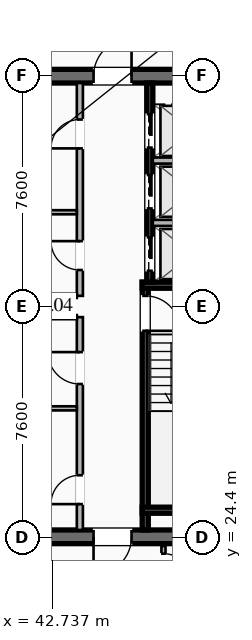
"""IFC4 building model, lengths in metres.
Left out: names, types, materials, properties, quantities, classifications, styles, units other than length and angle.
Written with IfcOpenShell. Run it as: python <this file> out.ifc"""

import sys

from ifc_helpers import new_model, si_unit, direction, frame, frame_2d, origin, place, context, subcontext, project, spatial, rectangle, extrude, element, fill, save


model = new_model("IFC4")
c1 = context("Model", 3, precision=1e-05, world=origin(), true_north=direction((0.0, 1.0)))
c2 = subcontext(c1, "Body", "Model", "MODEL_VIEW")
j1 = project(units=[si_unit("LENGTHUNIT", "METRE"), si_unit("PLANEANGLEUNIT", "RADIAN")], contexts=[c1])
p1 = place(None, origin())
s1 = spatial("IfcSite", under=j1, at=p1, CompositionType="ELEMENT")
p2 = place(p1, origin())
s2 = spatial("IfcBuilding", under=s1, at=p2, CompositionType="ELEMENT")
p3 = place(p2, frame((0.0, 0.0, 243.25)))
s3 = spatial("IfcBuildingStorey", under=s2, at=p3, CompositionType="ELEMENT", Elevation=243.25)
p4 = place(p3, frame((49.35, 24.425, 0.0), z_axis=(0.0, 0.0, 1.0), x_axis=(-1.0, 0.0, 0.0)))
e1 = element("IfcWall", 1, at=p4, inside=s3, PredefinedType="SHEAR", context=c2, shape_type="SweptSolid", body=[
    extrude(rectangle(XDim=14.7, YDim=0.45, at=frame_2d((7.35, 0.0))), origin(), (0.0, 0.0, 1.0), 3.55),
])
p5 = place(p4, frame((9.05, 0.0, 0.0)))
e2 = element("IfcOpeningElement", 2, at=p5, cuts=e1, PredefinedType="OPENING", context=c2, shape_type="SweptSolid", body=[
    extrude(rectangle(XDim=1.25, YDim=2.25, at=frame_2d((0.625, 1.125))), frame((0.0, 0.235, 0.0), z_axis=(0.0, -1.0, 0.0), x_axis=(1.0, 0.0, 0.0)), (0.0, 0.0, 1.0), 0.47),
])
p6 = place(p4, frame((4.0, 0.0, 0.0)))
e3 = element("IfcOpeningElement", 3, at=p6, cuts=e1, PredefinedType="OPENING", context=c2, shape_type="SweptSolid", body=[
    extrude(rectangle(XDim=1.25, YDim=2.25, at=frame_2d((0.625, 1.125))), frame((0.0, 0.235, 0.0), z_axis=(0.0, -1.0, 0.0), x_axis=(1.0, 0.0, 0.0)), (0.0, 0.0, 1.0), 0.47),
])
p7 = place(p3, frame((34.65, 39.575, 0.0), z_axis=(0.0, 0.0, 1.0), x_axis=(1.0, 0.0, 0.0)))
e4 = element("IfcWall", 4, at=p7, inside=s3, PredefinedType="SHEAR", context=c2, shape_type="SweptSolid", body=[
    extrude(rectangle(XDim=14.7, YDim=0.45, at=frame_2d((7.35, 0.0))), origin(), (0.0, 0.0, 1.0), 3.55),
])
p8 = place(p7, frame((4.4, 0.0, 0.0)))
e5 = element("IfcOpeningElement", 5, at=p8, cuts=e4, PredefinedType="OPENING", context=c2, shape_type="SweptSolid", body=[
    extrude(rectangle(XDim=1.25, YDim=2.25, at=frame_2d((0.625, 1.125))), frame((0.0, 0.235, 0.0), z_axis=(0.0, -1.0, 0.0), x_axis=(1.0, 0.0, 0.0)), (0.0, 0.0, 1.0), 0.47),
])
p9 = place(p7, frame((9.45, 0.0, 0.0)))
e6 = element("IfcOpeningElement", 6, at=p9, cuts=e4, PredefinedType="OPENING", context=c2, shape_type="SweptSolid", body=[
    extrude(rectangle(XDim=1.25, YDim=2.25, at=frame_2d((0.625, 1.125))), frame((0.0, 0.235, 0.0), z_axis=(0.0, -1.0, 0.0), x_axis=(1.0, 0.0, 0.0)), (0.0, 0.0, 1.0), 0.47),
])
p10 = place(p3, frame((45.8, 32.8, 0.0), z_axis=(0.0, 0.0, 1.0), x_axis=(0.0, -1.0, 0.0)))
e7 = element("IfcWall", 7, at=p10, inside=s3, PredefinedType="SHEAR", context=c2, shape_type="SweptSolid", body=[
    extrude(rectangle(XDim=8.15, YDim=0.2, at=frame_2d((4.075, 0.0))), origin(), (0.0, 0.0, 1.0), 3.25),
])
p11 = place(p10, frame((0.45, 0.0, 0.0)))
e8 = element("IfcOpeningElement", 8, at=p11, cuts=e7, PredefinedType="OPENING", context=c2, shape_type="SweptSolid", body=[
    extrude(rectangle(XDim=1.15, YDim=2.2, at=frame_2d((0.575, 1.1))), frame((0.0, 0.11, 0.0), z_axis=(0.0, -1.0, 0.0), x_axis=(1.0, 0.0, 0.0)), (0.0, 0.0, 1.0), 0.22),
])
for number, where, z_axis, x_axis in (
    (9, (45.7, 32.7, 0.0), (0.0, 0.0, 1.0), (1.0, 0.0, 0.0)),
    (10, (45.7, 25.3, 0.0), (0.0, 0.0, 1.0), (1.0, 0.0, 0.0)),
):
    element("IfcWall", number, at=place(p3, frame(where, z_axis=z_axis, x_axis=x_axis)), inside=s3, PredefinedType="SHEAR", context=c2, shape_type="SweptSolid", body=[
        extrude(rectangle(XDim=3.65, YDim=0.2, at=frame_2d((1.825, 0.0))), origin(), (0.0, 0.0, 1.0), 3.25),
    ])
p12 = place(p3, frame((45.95, 39.35, 0.0), z_axis=(0.0, 0.0, 1.0), x_axis=(0.0, -1.0, 0.0)))
e11 = element("IfcWall", 11, at=p12, inside=s3, PredefinedType="SHEAR", context=c2, shape_type="SweptSolid", body=[
    extrude(rectangle(XDim=6.55, YDim=0.2, at=frame_2d((3.275, 0.0))), origin(), (0.0, 0.0, 1.0), 3.25),
])
p13 = place(p12, frame((5.075, 0.0, 0.0)))
e12 = element("IfcOpeningElement", 12, at=p13, cuts=e11, PredefinedType="OPENING", context=c2, shape_type="SweptSolid", body=[
    extrude(rectangle(XDim=1.1, YDim=2.2, at=frame_2d((0.55, 1.1))), frame((0.0, 0.11, 0.0), z_axis=(0.0, -1.0, 0.0), x_axis=(1.0, 0.0, 0.0)), (0.0, 0.0, 1.0), 0.22),
])
p14 = place(p12, frame((3.025, 0.0, 0.0)))
e13 = element("IfcOpeningElement", 13, at=p14, cuts=e11, PredefinedType="OPENING", context=c2, shape_type="SweptSolid", body=[
    extrude(rectangle(XDim=1.1, YDim=2.2, at=frame_2d((0.55, 1.1))), frame((0.0, 0.11, 0.0), z_axis=(0.0, -1.0, 0.0), x_axis=(1.0, 0.0, 0.0)), (0.0, 0.0, 1.0), 0.22),
])
p15 = place(p12, frame((1.025, 0.0, 0.0)))
e14 = element("IfcOpeningElement", 14, at=p15, cuts=e11, PredefinedType="OPENING", context=c2, shape_type="SweptSolid", body=[
    extrude(rectangle(XDim=1.1, YDim=2.2, at=frame_2d((0.55, 1.1))), frame((0.0, 0.11, 0.0), z_axis=(0.0, -1.0, 0.0), x_axis=(1.0, 0.0, 0.0)), (0.0, 0.0, 1.0), 0.22),
])
for number, where, z_axis, x_axis in (
    (15, (46.05, 34.75, 0.0), (0.0, 0.0, 1.0), (1.0, 0.0, 0.0)),
    (16, (46.05, 36.8, 0.0), (0.0, 0.0, 1.0), (1.0, 0.0, 0.0)),
):
    element("IfcWall", number, at=place(p3, frame(where, z_axis=z_axis, x_axis=x_axis)), inside=s3, PredefinedType="SOLIDWALL", context=c2, shape_type="SweptSolid", body=[
        extrude(rectangle(XDim=3.3, YDim=0.2, at=frame_2d((1.65, 0.0))), origin(), (0.0, 0.0, 1.0), 3.25),
    ])
p16 = place(p3, frame((43.65, 24.65, 0.0), z_axis=(0.0, 0.0, 1.0), x_axis=(0.0, 1.0, 0.0)))
e17 = element("IfcWall", 17, at=p16, inside=s3, PredefinedType="SOLIDWALL", context=c2, shape_type="SweptSolid", body=[
    extrude(rectangle(XDim=7.0, YDim=0.2, at=frame_2d((3.5, 0.0))), origin(), (0.0, 0.0, 1.0), 2.393),
])
p17 = place(p16, frame((0.85, 0.0, 0.0)))
e18 = element("IfcOpeningElement", 18, at=p17, cuts=e17, PredefinedType="OPENING", context=c2, shape_type="SweptSolid", body=[
    extrude(rectangle(XDim=0.95, YDim=2.05, at=frame_2d((0.475, 1.025))), frame((0.0, 0.11, 0.0), z_axis=(0.0, -1.0, 0.0), x_axis=(1.0, 0.0, 0.0)), (0.0, 0.0, 1.0), 0.22),
])
p18 = place(p16, frame((4.8, 0.0, 0.0)))
e19 = element("IfcOpeningElement", 19, at=p18, cuts=e17, PredefinedType="OPENING", context=c2, shape_type="SweptSolid", body=[
    extrude(rectangle(XDim=1.05, YDim=2.2, at=frame_2d((0.525, 1.1))), frame((0.0, 0.11, 0.0), z_axis=(0.0, -1.0, 0.0), x_axis=(1.0, 0.0, 0.0)), (0.0, 0.0, 1.0), 0.22),
])
for number, where, z_axis, x_axis in (
    (20, (41.67, 31.65, 0.0), (0.0, 0.0, 1.0), (1.0, 0.0, 0.0)),
    (21, (41.67, 28.65, 0.0), (0.0, 0.0, 1.0), (1.0, 0.0, 0.0)),
):
    element("IfcWall", number, at=place(p3, frame(where, z_axis=z_axis, x_axis=x_axis)), inside=s3, PredefinedType="PARTITIONING", context=c2, shape_type="SweptSolid", body=[
        extrude(rectangle(XDim=1.88, YDim=0.135, at=frame_2d((0.94, 0.0))), origin(), (0.0, 0.0, 1.0), 2.393),
    ])
p19 = place(p3, frame((43.65, 32.35, 0.0), z_axis=(0.0, 0.0, 1.0), x_axis=(0.0, 1.0, 0.0)))
e22 = element("IfcWall", 22, at=p19, inside=s3, PredefinedType="SOLIDWALL", context=c2, shape_type="SweptSolid", body=[
    extrude(rectangle(XDim=7.0, YDim=0.2, at=frame_2d((3.5, 0.0))), origin(), (0.0, 0.0, 1.0), 2.393),
])
p20 = place(p19, frame((0.85, 0.0, 0.0)))
e23 = element("IfcOpeningElement", 23, at=p20, cuts=e22, PredefinedType="OPENING", context=c2, shape_type="SweptSolid", body=[
    extrude(rectangle(XDim=0.95, YDim=2.05, at=frame_2d((0.475, 1.025))), frame((0.0, 0.11, 0.0), z_axis=(0.0, -1.0, 0.0), x_axis=(1.0, 0.0, 0.0)), (0.0, 0.0, 1.0), 0.22),
])
p21 = place(p19, frame((4.85, 0.0, 0.0)))
e24 = element("IfcOpeningElement", 24, at=p21, cuts=e22, PredefinedType="OPENING", context=c2, shape_type="SweptSolid", body=[
    extrude(rectangle(XDim=0.95, YDim=2.05, at=frame_2d((0.475, 1.025))), frame((0.0, 0.11, 0.0), z_axis=(0.0, -1.0, 0.0), x_axis=(1.0, 0.0, 0.0)), (0.0, 0.0, 1.0), 0.22),
])
for number, where, z_axis, x_axis in (
    (25, (41.67, 32.35, 0.0), (0.0, 0.0, 1.0), (1.0, 0.0, 0.0)),
    (26, (41.67, 35.1, 0.0), (0.0, 0.0, 1.0), (1.0, 0.0, 0.0)),
):
    element("IfcWall", number, at=place(p3, frame(where, z_axis=z_axis, x_axis=x_axis)), inside=s3, PredefinedType="PARTITIONING", context=c2, shape_type="SweptSolid", body=[
        extrude(rectangle(XDim=1.88, YDim=0.135, at=frame_2d((0.94, 0.0))), origin(), (0.0, 0.0, 1.0), 2.393),
    ])
p22 = place(p3, frame((46.4, 24.12, 0.0), z_axis=(0.0, 0.0, 1.0), x_axis=(0.0, -1.0, 0.0)))
e27 = element("IfcWall", 27, at=p22, inside=s3, PredefinedType="PARTITIONING", context=c2, shape_type="SweptSolid", body=[
    extrude(rectangle(XDim=2.19, YDim=0.135, at=frame_2d((1.095, 0.0))), origin(), (0.0, 0.0, 1.0), 2.393),
])
p23 = place(p22, frame((0.25, 0.0, 0.0)))
e28 = element("IfcOpeningElement", 28, at=p23, cuts=e27, PredefinedType="OPENING", context=c2, shape_type="SweptSolid", body=[
    extrude(rectangle(XDim=0.95, YDim=2.05, at=frame_2d((0.475, 1.025))), frame((0.0, 0.077, 0.0), z_axis=(0.0, -1.0, 0.0), x_axis=(1.0, 0.0, 0.0)), (0.0, 0.0, 1.0), 0.155),
])
p24 = place(p9, origin())
e29 = element("IfcDoor", 29, at=p24, inside=s3, OperationType="SINGLE_SWING_RIGHT", PredefinedType="DOOR", context=c2, shape_type="SweptSolid", body=[
    extrude(rectangle(XDim=1.25, YDim=2.25, at=frame_2d((0.625, 1.125))), frame((0.0, 0.025, 0.0), z_axis=(0.0, -1.0, 0.0), x_axis=(1.0, 0.0, 0.0)), (0.0, 0.0, 1.0), 0.05),
])
fill(e6, e29)
p25 = place(p6, origin())
e30 = element("IfcDoor", 30, at=p25, inside=s3, OperationType="SINGLE_SWING_RIGHT", PredefinedType="DOOR", context=c2, shape_type="SweptSolid", body=[
    extrude(rectangle(XDim=1.25, YDim=2.25, at=frame_2d((0.625, 1.125))), frame((0.0, 0.025, 0.0), z_axis=(0.0, -1.0, 0.0), x_axis=(1.0, 0.0, 0.0)), (0.0, 0.0, 1.0), 0.05),
])
fill(e3, e30)
p26 = place(p11, origin())
e31 = element("IfcDoor", 31, at=p26, inside=s3, OperationType="SINGLE_SWING_RIGHT", PredefinedType="DOOR", context=c2, shape_type="SweptSolid", body=[
    extrude(rectangle(XDim=1.15, YDim=2.2, at=frame_2d((0.575, 1.1))), frame((0.0, 0.025, 0.0), z_axis=(0.0, -1.0, 0.0), x_axis=(1.0, 0.0, 0.0)), (0.0, 0.0, 1.0), 0.05),
])
fill(e8, e31)
p27 = place(p17, origin())
e32 = element("IfcDoor", 32, at=p27, inside=s3, OperationType="SINGLE_SWING_LEFT", PredefinedType="DOOR", context=c2, shape_type="SweptSolid", body=[
    extrude(rectangle(XDim=0.95, YDim=2.05, at=frame_2d((0.475, 1.025))), frame((0.0, 0.025, 0.0), z_axis=(0.0, -1.0, 0.0), x_axis=(1.0, 0.0, 0.0)), (0.0, 0.0, 1.0), 0.05),
])
fill(e18, e32)
p28 = place(p18, origin())
e33 = element("IfcDoor", 33, at=p28, inside=s3, OperationType="SINGLE_SWING_RIGHT", PredefinedType="DOOR", context=c2, shape_type="SweptSolid", body=[
    extrude(rectangle(XDim=1.05, YDim=2.2, at=frame_2d((0.525, 1.1))), frame((0.0, 0.025, 0.0), z_axis=(0.0, -1.0, 0.0), x_axis=(1.0, 0.0, 0.0)), (0.0, 0.0, 1.0), 0.05),
])
fill(e19, e33)
p29 = place(p20, origin())
e34 = element("IfcDoor", 34, at=p29, inside=s3, OperationType="SINGLE_SWING_RIGHT", PredefinedType="DOOR", context=c2, shape_type="SweptSolid", body=[
    extrude(rectangle(XDim=0.95, YDim=2.05, at=frame_2d((0.475, 1.025))), frame((0.0, 0.025, 0.0), z_axis=(0.0, -1.0, 0.0), x_axis=(1.0, 0.0, 0.0)), (0.0, 0.0, 1.0), 0.05),
])
fill(e23, e34)
p30 = place(p21, origin())
e35 = element("IfcDoor", 35, at=p30, inside=s3, OperationType="SINGLE_SWING_LEFT", PredefinedType="DOOR", context=c2, shape_type="SweptSolid", body=[
    extrude(rectangle(XDim=0.95, YDim=2.05, at=frame_2d((0.475, 1.025))), frame((0.0, 0.025, 0.0), z_axis=(0.0, -1.0, 0.0), x_axis=(1.0, 0.0, 0.0)), (0.0, 0.0, 1.0), 0.05),
])
fill(e24, e35)
p31 = place(p23, origin())
e36 = element("IfcDoor", 36, at=p31, inside=s3, OperationType="SINGLE_SWING_RIGHT", PredefinedType="DOOR", context=c2, shape_type="SweptSolid", body=[
    extrude(rectangle(XDim=0.95, YDim=2.05, at=frame_2d((0.475, 1.025))), frame((0.0, 0.025, 0.0), z_axis=(0.0, -1.0, 0.0), x_axis=(1.0, 0.0, 0.0)), (0.0, 0.0, 1.0), 0.05),
])
fill(e28, e36)
p32 = place(p13, origin())
e37 = element("IfcDoor", 37, at=p32, inside=s3, OperationType="SLIDING_TO_LEFT", PredefinedType="DOOR", context=c2, shape_type="SweptSolid", body=[
    extrude(rectangle(XDim=1.1, YDim=2.2, at=frame_2d((0.55, 1.1))), frame((0.0, 0.025, 0.0), z_axis=(0.0, -1.0, 0.0), x_axis=(1.0, 0.0, 0.0)), (0.0, 0.0, 1.0), 0.05),
])
fill(e12, e37)
p33 = place(p14, origin())
e38 = element("IfcDoor", 38, at=p33, inside=s3, OperationType="SLIDING_TO_LEFT", PredefinedType="DOOR", context=c2, shape_type="SweptSolid", body=[
    extrude(rectangle(XDim=1.1, YDim=2.2, at=frame_2d((0.55, 1.1))), frame((0.0, 0.025, 0.0), z_axis=(0.0, -1.0, 0.0), x_axis=(1.0, 0.0, 0.0)), (0.0, 0.0, 1.0), 0.05),
])
fill(e13, e38)
p34 = place(p15, origin())
e39 = element("IfcDoor", 39, at=p34, inside=s3, OperationType="SLIDING_TO_LEFT", PredefinedType="DOOR", context=c2, shape_type="SweptSolid", body=[
    extrude(rectangle(XDim=1.1, YDim=2.2, at=frame_2d((0.55, 1.1))), frame((0.0, 0.025, 0.0), z_axis=(0.0, -1.0, 0.0), x_axis=(1.0, 0.0, 0.0)), (0.0, 0.0, 1.0), 0.05),
])
fill(e14, e39)
save(model, sys.argv[1])
